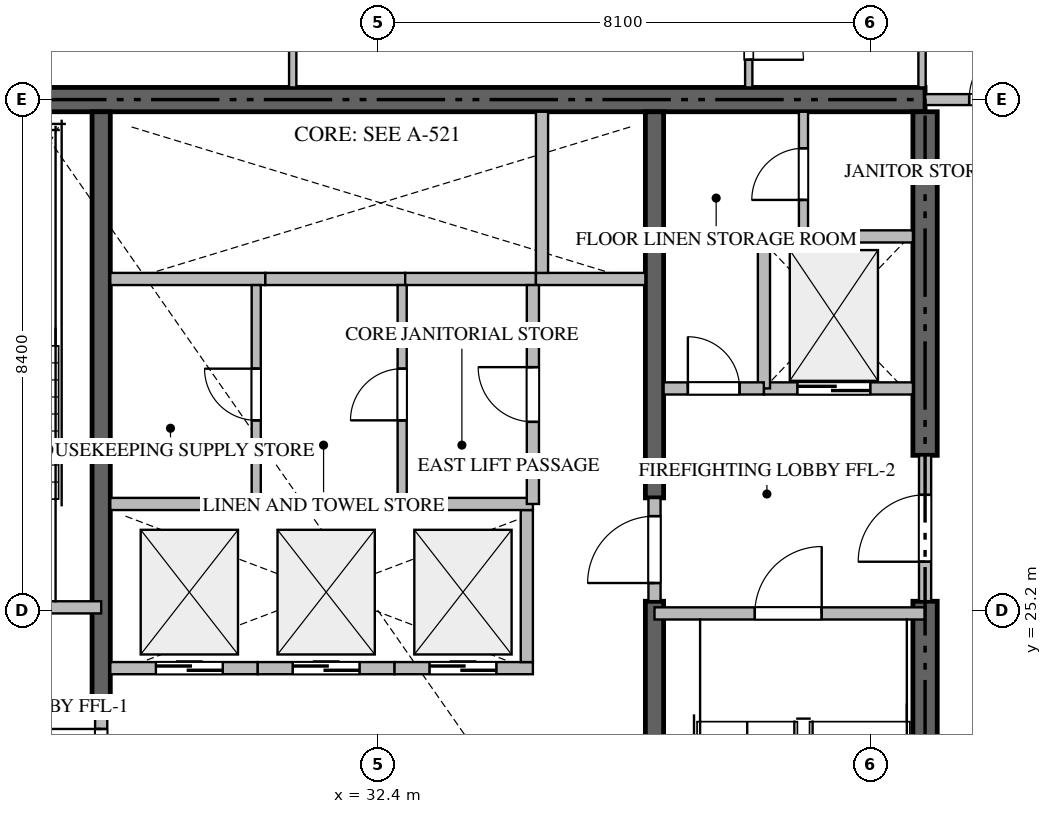
"""IFC4 building model, lengths in metres.
Left out: names, types, materials, properties, quantities, classifications, styles, units other than length and angle.
Written with IfcOpenShell. Run it as: python <this file> out.ifc"""

import sys

from ifc_helpers import new_model, si_unit, direction, frame, frame_2d, origin, place, context, subcontext, project, spatial, rectangle, extrude, source, transform, mapped, element, fill, save


model = new_model("IFC4")
c1 = context("Model", 3, precision=1e-05, world=origin(), true_north=direction((0.0, 1.0)))
c2 = subcontext(c1, "Body", "Model", "MODEL_VIEW")
j1 = project(units=[si_unit("LENGTHUNIT", "METRE"), si_unit("PLANEANGLEUNIT", "RADIAN")], contexts=[c1])
p1 = place(None, origin())
s1 = spatial("IfcSite", under=j1, at=p1, CompositionType="ELEMENT")
p2 = place(p1, origin())
s2 = spatial("IfcBuilding", under=s1, at=p2, CompositionType="ELEMENT")
p3 = place(p2, frame((0.0, 0.0, 195.15)))
s3 = spatial("IfcBuildingStorey", under=s2, at=p3, CompositionType="ELEMENT", Elevation=195.15)
p4 = place(p3, frame((41.4, 33.6, -0.26), z_axis=(0.0, 0.0, 1.0), x_axis=(-1.0, 0.0, 0.0)))
e1 = element("IfcWall", 1, at=p4, inside=s3, PredefinedType="SHEAR", context=c2, shape_type="SweptSolid", body=[
    extrude(rectangle(XDim=18.0, YDim=0.4, at=frame_2d((9.0, 0.0))), origin(), (0.0, 0.0, 1.0), 3.568),
])
p5 = place(p3, frame((41.4, 17.0, -0.26), z_axis=(0.0, 0.0, 1.0), x_axis=(0.0, 1.0, 0.0)))
e2 = element("IfcWall", 2, at=p5, inside=s3, PredefinedType="SHEAR", context=c2, shape_type="SweptSolid", body=[
    extrude(rectangle(XDim=8.35, YDim=0.4, at=frame_2d((4.175, 0.0))), origin(), (0.0, 0.0, 1.0), 3.568),
])
p6 = place(p3, frame((41.4, 27.75, -0.26), z_axis=(0.0, 0.0, 1.0), x_axis=(0.0, 1.0, 0.0)))
e3 = element("IfcWall", 3, at=p6, inside=s3, PredefinedType="SHEAR", context=c2, shape_type="SweptSolid", body=[
    extrude(rectangle(XDim=5.65, YDim=0.4, at=frame_2d((2.825, 0.0))), origin(), (0.0, 0.0, 1.0), 3.568),
])
p7 = place(p3, frame((27.85, 23.55, -0.26), z_axis=(0.0, 0.0, 1.0), x_axis=(0.0, 1.0, 0.0)))
e4 = element("IfcWall", 4, at=p7, inside=s3, PredefinedType="SHEAR", context=c2, shape_type="SweptSolid", body=[
    extrude(rectangle(XDim=9.85, YDim=0.3, at=frame_2d((4.925, 0.0))), origin(), (0.0, 0.0, 1.0), 3.568),
])
p8 = place(p3, frame((36.95, 17.0, -0.26), z_axis=(0.0, 0.0, 1.0), x_axis=(0.0, 1.0, 0.0)))
e5 = element("IfcWall", 5, at=p8, inside=s3, PredefinedType="SHEAR", context=c2, shape_type="SweptSolid", body=[
    extrude(rectangle(XDim=8.35, YDim=0.3, at=frame_2d((4.175, 0.0))), origin(), (0.0, 0.0, 1.0), 3.568),
])
p9 = place(p3, frame((36.95, 27.05, -0.26), z_axis=(0.0, 0.0, 1.0), x_axis=(0.0, 1.0, 0.0)))
e6 = element("IfcWall", 6, at=p9, inside=s3, PredefinedType="SHEAR", context=c2, shape_type="SweptSolid", body=[
    extrude(rectangle(XDim=6.35, YDim=0.3, at=frame_2d((3.175, 0.0))), origin(), (0.0, 0.0, 1.0), 3.568),
])
p10 = place(p3, frame((23.4, 25.25, 0.0), z_axis=(0.0, 0.0, 1.0), x_axis=(1.0, 0.0, 0.0)))
e7 = element("IfcWall", 7, at=p10, inside=s3, PredefinedType="STANDARD", context=c2, shape_type="SweptSolid", body=[
    extrude(rectangle(XDim=4.45, YDim=0.2, at=frame_2d((2.225, 0.0))), origin(), (0.0, 0.0, 1.0), 3.31),
])
p11 = place(p10, frame((1.65, 0.0, 0.0)))
e8 = element("IfcOpeningElement", 8, at=p11, cuts=e7, PredefinedType="OPENING", context=c2, shape_type="SweptSolid", body=[
    extrude(rectangle(XDim=1.1, YDim=2.15, at=frame_2d((0.55, 1.075))), frame((0.0, 0.11, 0.0), z_axis=(0.0, -1.0, 0.0), x_axis=(1.0, 0.0, 0.0)), (0.0, 0.0, 1.0), 0.22),
])
p12 = place(p3, frame((36.95, 25.15, 0.0), z_axis=(0.0, 0.0, 1.0), x_axis=(1.0, 0.0, 0.0)))
e9 = element("IfcWall", 9, at=p12, inside=s3, PredefinedType="STANDARD", context=c2, shape_type="SweptSolid", body=[
    extrude(rectangle(XDim=4.45, YDim=0.2, at=frame_2d((2.225, 0.0))), origin(), (0.0, 0.0, 1.0), 3.31),
])
p13 = place(p12, frame((1.65, 0.0, 0.0)))
e10 = element("IfcOpeningElement", 10, at=p13, cuts=e9, PredefinedType="OPENING", context=c2, shape_type="SweptSolid", body=[
    extrude(rectangle(XDim=1.1, YDim=2.15, at=frame_2d((0.55, 1.075))), frame((0.0, 0.11, 0.0), z_axis=(0.0, -1.0, 0.0), x_axis=(1.0, 0.0, 0.0)), (0.0, 0.0, 1.0), 0.22),
])
p14 = place(p3, frame((38.75, 28.85, 0.0), z_axis=(0.0, 0.0, 1.0), x_axis=(1.0, 0.0, 0.0)))
e11 = element("IfcWall", 11, at=p14, inside=s3, PredefinedType="STANDARD", context=c2, shape_type="SweptSolid", body=[
    extrude(rectangle(XDim=2.45, YDim=0.2, at=frame_2d((1.225, 0.0))), origin(), (0.0, 0.0, 1.0), 3.31),
])
p15 = place(p14, frame((0.55, 0.0, 0.0)))
e12 = element("IfcOpeningElement", 12, at=p15, cuts=e11, PredefinedType="OPENING", context=c2, shape_type="SweptSolid", body=[
    extrude(rectangle(XDim=1.2, YDim=2.2, at=frame_2d((0.6, 1.1))), frame((0.0, 0.11, 0.0), z_axis=(0.0, -1.0, 0.0), x_axis=(1.0, 0.0, 0.0)), (0.0, 0.0, 1.0), 0.22),
])
p16 = place(p3, frame((28.0, 24.25, 0.0), z_axis=(0.0, 0.0, 1.0), x_axis=(1.0, 0.0, 0.0)))
e13 = element("IfcWall", 13, at=p16, inside=s3, PredefinedType="STANDARD", context=c2, shape_type="SweptSolid", body=[
    extrude(rectangle(XDim=2.425, YDim=0.2, at=frame_2d((1.212, 0.0))), origin(), (0.0, 0.0, 1.0), 3.31),
])
p17 = place(p16, frame((0.75, 0.0, 0.0)))
e14 = element("IfcOpeningElement", 14, at=p17, cuts=e13, PredefinedType="OPENING", context=c2, shape_type="SweptSolid", body=[
    extrude(rectangle(XDim=1.1, YDim=2.2, at=frame_2d((0.55, 1.1))), frame((0.0, 0.11, 0.0), z_axis=(0.0, -1.0, 0.0), x_axis=(1.0, 0.0, 0.0)), (0.0, 0.0, 1.0), 0.22),
])
p18 = place(p3, frame((30.425, 24.25, 0.0), z_axis=(0.0, 0.0, 1.0), x_axis=(1.0, 0.0, 0.0)))
e15 = element("IfcWall", 15, at=p18, inside=s3, PredefinedType="STANDARD", context=c2, shape_type="SweptSolid", body=[
    extrude(rectangle(XDim=2.25, YDim=0.2, at=frame_2d((1.125, 0.0))), origin(), (0.0, 0.0, 1.0), 3.31),
])
p19 = place(p18, frame((0.575, 0.0, 0.0)))
e16 = element("IfcOpeningElement", 16, at=p19, cuts=e15, PredefinedType="OPENING", context=c2, shape_type="SweptSolid", body=[
    extrude(rectangle(XDim=1.1, YDim=2.2, at=frame_2d((0.55, 1.1))), frame((0.0, 0.11, 0.0), z_axis=(0.0, -1.0, 0.0), x_axis=(1.0, 0.0, 0.0)), (0.0, 0.0, 1.0), 0.22),
])
p20 = place(p3, frame((32.675, 24.25, 0.0), z_axis=(0.0, 0.0, 1.0), x_axis=(1.0, 0.0, 0.0)))
e17 = element("IfcWall", 17, at=p20, inside=s3, PredefinedType="STANDARD", context=c2, shape_type="SweptSolid", body=[
    extrude(rectangle(XDim=2.275, YDim=0.2, at=frame_2d((1.137, 0.0))), origin(), (0.0, 0.0, 1.0), 3.31),
])
p21 = place(p20, frame((0.575, 0.0, 0.0)))
e18 = element("IfcOpeningElement", 18, at=p21, cuts=e17, PredefinedType="OPENING", context=c2, shape_type="SweptSolid", body=[
    extrude(rectangle(XDim=1.1, YDim=2.2, at=frame_2d((0.55, 1.1))), frame((0.0, 0.11, 0.0), z_axis=(0.0, -1.0, 0.0), x_axis=(1.0, 0.0, 0.0)), (0.0, 0.0, 1.0), 0.22),
])
p22 = place(p3, frame((34.85, 24.35, 0.0), z_axis=(0.0, 0.0, 1.0), x_axis=(0.0, 1.0, 0.0)))
e19 = element("IfcWall", 19, at=p22, inside=s3, PredefinedType="STANDARD", context=c2, shape_type="SweptSolid", body=[
    extrude(rectangle(XDim=2.5, YDim=0.2, at=frame_2d((1.25, 0.0))), origin(), (0.0, 0.0, 1.0), 3.31),
])
p23 = place(p3, frame((28.0, 30.65, 0.0), z_axis=(0.0, 0.0, 1.0), x_axis=(1.0, 0.0, 0.0)))
e20 = element("IfcWall", 20, at=p23, inside=s3, PredefinedType="STANDARD", context=c2, shape_type="SweptSolid", body=[
    extrude(rectangle(XDim=2.55, YDim=0.2, at=frame_2d((1.275, 0.0))), origin(), (0.0, 0.0, 1.0), 3.31),
])
p24 = place(p3, frame((30.55, 30.65, 0.0), z_axis=(0.0, 0.0, 1.0), x_axis=(1.0, 0.0, 0.0)))
e21 = element("IfcWall", 21, at=p24, inside=s3, PredefinedType="STANDARD", context=c2, shape_type="SweptSolid", body=[
    extrude(rectangle(XDim=2.3, YDim=0.2, at=frame_2d((1.15, 0.0))), origin(), (0.0, 0.0, 1.0), 3.31),
])
p25 = place(p3, frame((32.85, 30.65, 0.0), z_axis=(0.0, 0.0, 1.0), x_axis=(1.0, 0.0, 0.0)))
e22 = element("IfcWall", 22, at=p25, inside=s3, PredefinedType="STANDARD", context=c2, shape_type="SweptSolid", body=[
    extrude(rectangle(XDim=2.15, YDim=0.2, at=frame_2d((1.075, 0.0))), origin(), (0.0, 0.0, 1.0), 3.31),
])
p26 = place(p3, frame((35.0, 30.65, 0.0), z_axis=(0.0, 0.0, 1.0), x_axis=(1.0, 0.0, 0.0)))
e23 = element("IfcWall", 23, at=p26, inside=s3, PredefinedType="STANDARD", context=c2, shape_type="SweptSolid", body=[
    extrude(rectangle(XDim=1.8, YDim=0.2, at=frame_2d((0.9, 0.0))), origin(), (0.0, 0.0, 1.0), 3.31),
])
p27 = place(p3, frame((35.1, 30.75, 0.0), z_axis=(0.0, 0.0, 1.0), x_axis=(0.0, 1.0, 0.0)))
e24 = element("IfcWall", 24, at=p27, inside=s3, PredefinedType="STANDARD", context=c2, shape_type="SweptSolid", body=[
    extrude(rectangle(XDim=2.65, YDim=0.2, at=frame_2d((1.325, 0.0))), origin(), (0.0, 0.0, 1.0), 3.31),
])
p28 = place(p3, frame((38.75, 28.85, 0.0), z_axis=(0.0, 0.0, 1.0), x_axis=(0.0, 1.0, 0.0)))
e25 = element("IfcWall", 25, at=p28, inside=s3, PredefinedType="STANDARD", context=c2, shape_type="SweptSolid", body=[
    extrude(rectangle(XDim=2.5, YDim=0.2, at=frame_2d((1.25, 0.0))), origin(), (0.0, 0.0, 1.0), 3.31),
])
p29 = place(p3, frame((38.75, 31.35, 0.0), z_axis=(0.0, 0.0, 1.0), x_axis=(1.0, 0.0, 0.0)))
e26 = element("IfcWall", 26, at=p29, inside=s3, PredefinedType="STANDARD", context=c2, shape_type="SweptSolid", body=[
    extrude(rectangle(XDim=2.45, YDim=0.2, at=frame_2d((1.225, 0.0))), origin(), (0.0, 0.0, 1.0), 3.31),
])
p30 = place(p3, frame((37.1, 28.85, 0.0), z_axis=(0.0, 0.0, 1.0), x_axis=(1.0, 0.0, 0.0)))
e27 = element("IfcWall", 27, at=p30, inside=s3, PredefinedType="STANDARD", context=c2, shape_type="SweptSolid", body=[
    extrude(rectangle(XDim=1.648, YDim=0.2, at=frame_2d((0.824, 0.0))), origin(), (0.0, 0.0, 1.0), 3.31),
])
p31 = place(p30, frame((0.399, 0.0, 0.0)))
e28 = element("IfcOpeningElement", 28, at=p31, cuts=e27, PredefinedType="OPENING", context=c2, shape_type="SweptSolid", body=[
    extrude(rectangle(XDim=0.85, YDim=2.1, at=frame_2d((0.425, 1.05))), frame((0.0, 0.11, 0.0), z_axis=(0.0, -1.0, 0.0), x_axis=(1.0, 0.0, 0.0)), (0.0, 0.0, 1.0), 0.22),
])
p32 = place(p3, frame((41.4, 25.352, 0.0), z_axis=(0.0, 0.0, 1.0), x_axis=(0.0, 1.0, 0.0)))
e29 = element("IfcWall", 29, at=p32, inside=s3, PredefinedType="STANDARD", context=c2, shape_type="SweptSolid", body=[
    extrude(rectangle(XDim=2.396, YDim=0.2, at=frame_2d((1.198, 0.0))), origin(), (0.0, 0.0, 1.0), 3.31),
])
p33 = place(p32, frame((0.648, 0.0, 0.0)))
e30 = element("IfcOpeningElement", 30, at=p33, cuts=e29, PredefinedType="OPENING", context=c2, shape_type="SweptSolid", body=[
    extrude(rectangle(XDim=1.1, YDim=2.15, at=frame_2d((0.55, 1.075))), frame((0.0, 0.11, 0.0), z_axis=(0.0, -1.0, 0.0), x_axis=(1.0, 0.0, 0.0)), (0.0, 0.0, 1.0), 0.22),
])
p34 = place(p3, frame((27.85, 21.852, 0.0), z_axis=(0.0, 0.0, 1.0), x_axis=(0.0, 1.0, 0.0)))
e31 = element("IfcWall", 31, at=p34, inside=s3, PredefinedType="STANDARD", context=c2, shape_type="SweptSolid", body=[
    extrude(rectangle(XDim=1.696, YDim=0.2, at=frame_2d((0.848, 0.0))), origin(), (0.0, 0.0, 1.0), 3.31),
])
p35 = place(p34, frame((0.298, 0.0, 0.0)))
e32 = element("IfcOpeningElement", 32, at=p35, cuts=e31, PredefinedType="OPENING", context=c2, shape_type="SweptSolid", body=[
    extrude(rectangle(XDim=1.1, YDim=2.15, at=frame_2d((0.55, 1.075))), frame((0.0, 0.11, 0.0), z_axis=(0.0, -1.0, 0.0), x_axis=(1.0, 0.0, 0.0)), (0.0, 0.0, 1.0), 0.22),
])
p36 = place(p3, frame((36.95, 25.352, 0.0), z_axis=(0.0, 0.0, 1.0), x_axis=(0.0, 1.0, 0.0)))
e33 = element("IfcWall", 33, at=p36, inside=s3, PredefinedType="STANDARD", context=c2, shape_type="SweptSolid", body=[
    extrude(rectangle(XDim=1.696, YDim=0.2, at=frame_2d((0.848, 0.0))), origin(), (0.0, 0.0, 1.0), 3.31),
])
p37 = place(p36, frame((0.298, 0.0, 0.0)))
e34 = element("IfcOpeningElement", 34, at=p37, cuts=e33, PredefinedType="OPENING", context=c2, shape_type="SweptSolid", body=[
    extrude(rectangle(XDim=1.1, YDim=2.15, at=frame_2d((0.55, 1.075))), frame((0.0, 0.11, 0.0), z_axis=(0.0, -1.0, 0.0), x_axis=(1.0, 0.0, 0.0)), (0.0, 0.0, 1.0), 0.22),
])
p38 = place(p3, frame((28.0, 26.95, 0.0), z_axis=(0.0, 0.0, 1.0), x_axis=(1.0, 0.0, 0.0)))
e35 = element("IfcWall", 35, at=p38, inside=s3, PredefinedType="STANDARD", context=c2, shape_type="SweptSolid", body=[
    extrude(rectangle(XDim=6.95, YDim=0.2, at=frame_2d((3.475, 0.0))), origin(), (0.0, 0.0, 1.0), 3.31),
])
p39 = place(p3, frame((39.4, 31.35, 0.0), z_axis=(0.0, 0.0, 1.0), x_axis=(0.0, 1.0, 0.0)))
e36 = element("IfcWall", 36, at=p39, inside=s3, PredefinedType="PARTITIONING", context=c2, shape_type="SweptSolid", body=[
    extrude(rectangle(XDim=2.05, YDim=0.15, at=frame_2d((1.025, 0.0))), origin(), (0.0, 0.0, 1.0), 3.31),
])
p40 = place(p39, frame((0.6, 0.0, 0.0)))
e37 = element("IfcOpeningElement", 37, at=p40, cuts=e36, PredefinedType="OPENING", context=c2, shape_type="SweptSolid", body=[
    extrude(rectangle(XDim=0.85, YDim=2.1, at=frame_2d((0.425, 1.05))), frame((0.0, 0.085, 0.0), z_axis=(0.0, -1.0, 0.0), x_axis=(1.0, 0.0, 0.0)), (0.0, 0.0, 1.0), 0.17),
])
p41 = place(p3, frame((34.95, 26.95, 0.0), z_axis=(0.0, 0.0, 1.0), x_axis=(0.0, 1.0, 0.0)))
e38 = element("IfcWall", 38, at=p41, inside=s3, PredefinedType="STANDARD", context=c2, shape_type="SweptSolid", body=[
    extrude(rectangle(XDim=3.6, YDim=0.2, at=frame_2d((1.8, 0.0))), origin(), (0.0, 0.0, 1.0), 3.31),
])
p42 = place(p41, frame((1.35, 0.0, 0.0)))
e39 = element("IfcOpeningElement", 39, at=p42, cuts=e38, PredefinedType="OPENING", context=c2, shape_type="SweptSolid", body=[
    extrude(rectangle(XDim=0.9, YDim=2.1, at=frame_2d((0.45, 1.05))), frame((0.0, 0.11, 0.0), z_axis=(0.0, -1.0, 0.0), x_axis=(1.0, 0.0, 0.0)), (0.0, 0.0, 1.0), 0.22),
])
p43 = place(p3, frame((32.8, 26.95, 0.0), z_axis=(0.0, 0.0, 1.0), x_axis=(0.0, 1.0, 0.0)))
e40 = element("IfcWall", 40, at=p43, inside=s3, PredefinedType="PARTITIONING", context=c2, shape_type="SweptSolid", body=[
    extrude(rectangle(XDim=3.6, YDim=0.15, at=frame_2d((1.8, 0.0))), origin(), (0.0, 0.0, 1.0), 3.31),
])
p44 = place(p43, frame((1.375, 0.0, 0.0)))
e41 = element("IfcOpeningElement", 41, at=p44, cuts=e40, PredefinedType="OPENING", context=c2, shape_type="SweptSolid", body=[
    extrude(rectangle(XDim=0.85, YDim=2.1, at=frame_2d((0.425, 1.05))), frame((0.0, 0.085, 0.0), z_axis=(0.0, -1.0, 0.0), x_axis=(1.0, 0.0, 0.0)), (0.0, 0.0, 1.0), 0.17),
])
p45 = place(p3, frame((30.4, 26.95, 0.0), z_axis=(0.0, 0.0, 1.0), x_axis=(0.0, 1.0, 0.0)))
e42 = element("IfcWall", 42, at=p45, inside=s3, PredefinedType="PARTITIONING", context=c2, shape_type="SweptSolid", body=[
    extrude(rectangle(XDim=3.6, YDim=0.15, at=frame_2d((1.8, 0.0))), origin(), (0.0, 0.0, 1.0), 3.31),
])
p46 = place(p45, frame((1.375, 0.0, 0.0)))
e43 = element("IfcOpeningElement", 43, at=p46, cuts=e42, PredefinedType="OPENING", context=c2, shape_type="SweptSolid", body=[
    extrude(rectangle(XDim=0.85, YDim=2.1, at=frame_2d((0.425, 1.05))), frame((0.0, 0.085, 0.0), z_axis=(0.0, -1.0, 0.0), x_axis=(1.0, 0.0, 0.0)), (0.0, 0.0, 1.0), 0.17),
])
p47 = place(p3, frame((41.402, 33.6, 0.0), z_axis=(0.0, 0.0, 1.0), x_axis=(1.0, 0.0, 0.0)))
e44 = element("IfcWall", 44, at=p47, inside=s3, PredefinedType="PARTITIONING", context=c2, shape_type="SweptSolid", body=[
    extrude(rectangle(XDim=2.446, YDim=0.18, at=frame_2d((1.223, 0.0))), origin(), (0.0, 0.0, 1.0), 3.31),
])
p48 = place(p47, frame((0.723, 0.0, 0.0)))
e45 = element("IfcOpeningElement", 45, at=p48, cuts=e44, PredefinedType="OPENING", context=c2, shape_type="SweptSolid", body=[
    extrude(rectangle(XDim=1.0, YDim=2.15, at=frame_2d((0.5, 1.075))), frame((0.0, 0.1, 0.0), z_axis=(0.0, -1.0, 0.0), x_axis=(1.0, 0.0, 0.0)), (0.0, 0.0, 1.0), 0.2),
])
p49 = place(p3, frame((41.35, 36.35, 0.0), z_axis=(0.0, 0.0, 1.0), x_axis=(0.0, -1.0, 0.0)))
e46 = element("IfcWall", 46, at=p49, inside=s3, PredefinedType="PARTITIONING", context=c2, shape_type="SweptSolid", body=[
    extrude(rectangle(XDim=2.55, YDim=0.12, at=frame_2d((1.275, 0.0))), origin(), (0.0, 0.0, 1.0), 3.31),
])
p50 = place(p3, frame((38.5, 35.75, 0.0), z_axis=(0.0, 0.0, 1.0), x_axis=(0.0, -1.0, 0.0)))
e47 = element("IfcWall", 47, at=p50, inside=s3, PredefinedType="PARTITIONING", context=c2, shape_type="SweptSolid", body=[
    extrude(rectangle(XDim=1.95, YDim=0.12, at=frame_2d((0.975, 0.0))), origin(), (0.0, 0.0, 1.0), 3.31),
])
p51 = place(p50, frame((0.595, 0.0, 0.0)))
e48 = element("IfcOpeningElement", 48, at=p51, cuts=e47, PredefinedType="OPENING", context=c2, shape_type="SweptSolid", body=[
    extrude(rectangle(XDim=0.9, YDim=2.1, at=frame_2d((0.45, 1.05))), frame((0.0, 0.07, 0.0), z_axis=(0.0, -1.0, 0.0), x_axis=(1.0, 0.0, 0.0)), (0.0, 0.0, 1.0), 0.14),
])
p52 = place(p3, frame((31.0, 35.748, 0.0), z_axis=(0.0, 0.0, 1.0), x_axis=(0.0, -1.0, 0.0)))
e49 = element("IfcWall", 49, at=p52, inside=s3, PredefinedType="PARTITIONING", context=c2, shape_type="SweptSolid", body=[
    extrude(rectangle(XDim=1.948, YDim=0.12, at=frame_2d((0.974, 0.0))), origin(), (0.0, 0.0, 1.0), 3.31),
])
m1 = source(origin(), c2, "Body", "SweptSolid", [
    extrude(rectangle(XDim=1.1, YDim=2.15, at=frame_2d((0.55, 1.075))), frame((0.0, 0.025, 0.0), z_axis=(0.0, -1.0, 0.0), x_axis=(1.0, 0.0, 0.0)), (0.0, 0.0, 1.0), 0.05),
])
p53 = place(p13, origin())
e50 = element("IfcDoor", 50, at=p53, inside=s3, OperationType="SINGLE_SWING_RIGHT", PredefinedType="DOOR", context=c2, shape_type="MappedRepresentation", body=[
    mapped(m1, transform((0.0, 0.0, 0.0), scale=1.0)),
])
fill(e10, e50)
m2 = source(origin(), c2, "Body", "SweptSolid", [
    extrude(rectangle(XDim=1.2, YDim=2.2, at=frame_2d((0.6, 1.1))), frame((0.0, 0.025, 0.0), z_axis=(0.0, -1.0, 0.0), x_axis=(1.0, 0.0, 0.0)), (0.0, 0.0, 1.0), 0.05),
])
p54 = place(p15, origin())
e51 = element("IfcDoor", 51, at=p54, inside=s3, OperationType="DOUBLE_DOOR_SLIDING", PredefinedType="DOOR", context=c2, shape_type="MappedRepresentation", body=[
    mapped(m2, transform((0.0, 0.0, 0.0), scale=1.0)),
])
fill(e12, e51)
m3 = source(origin(), c2, "Body", "SweptSolid", [
    extrude(rectangle(XDim=1.1, YDim=2.2, at=frame_2d((0.55, 1.1))), frame((0.0, 0.025, 0.0), z_axis=(0.0, -1.0, 0.0), x_axis=(1.0, 0.0, 0.0)), (0.0, 0.0, 1.0), 0.05),
])
p55 = place(p17, origin())
e52 = element("IfcDoor", 52, at=p55, inside=s3, OperationType="DOUBLE_DOOR_SLIDING", PredefinedType="DOOR", context=c2, shape_type="MappedRepresentation", body=[
    mapped(m3, transform((0.0, 0.0, 0.0), scale=1.0)),
])
fill(e14, e52)
p56 = place(p19, origin())
e53 = element("IfcDoor", 53, at=p56, inside=s3, OperationType="DOUBLE_DOOR_SLIDING", PredefinedType="DOOR", context=c2, shape_type="MappedRepresentation", body=[
    mapped(m3, transform((0.0, 0.0, 0.0), scale=1.0)),
])
fill(e16, e53)
p57 = place(p21, origin())
e54 = element("IfcDoor", 54, at=p57, inside=s3, OperationType="DOUBLE_DOOR_SLIDING", PredefinedType="DOOR", context=c2, shape_type="MappedRepresentation", body=[
    mapped(m3, transform((0.0, 0.0, 0.0), scale=1.0)),
])
fill(e18, e54)
m4 = source(origin(), c2, "Body", "SweptSolid", [
    extrude(rectangle(XDim=0.85, YDim=2.1, at=frame_2d((0.425, 1.05))), frame((0.0, 0.025, 0.0), z_axis=(0.0, -1.0, 0.0), x_axis=(1.0, 0.0, 0.0)), (0.0, 0.0, 1.0), 0.05),
])
p58 = place(p31, origin())
e55 = element("IfcDoor", 55, at=p58, inside=s3, OperationType="SINGLE_SWING_LEFT", PredefinedType="DOOR", context=c2, shape_type="MappedRepresentation", body=[
    mapped(m4, transform((0.0, 0.0, 0.0), scale=1.0)),
])
fill(e28, e55)
p59 = place(p33, origin())
e56 = element("IfcDoor", 56, at=p59, inside=s3, OperationType="SINGLE_SWING_LEFT", PredefinedType="DOOR", context=c2, shape_type="MappedRepresentation", body=[
    mapped(m1, transform((0.0, 0.0, 0.0), scale=1.0)),
])
fill(e30, e56)
p60 = place(p35, origin())
e57 = element("IfcDoor", 57, at=p60, inside=s3, OperationType="SINGLE_SWING_RIGHT", PredefinedType="DOOR", context=c2, shape_type="MappedRepresentation", body=[
    mapped(m1, transform((0.0, 0.0, 0.0), scale=1.0)),
])
fill(e32, e57)
p61 = place(p37, origin())
e58 = element("IfcDoor", 58, at=p61, inside=s3, OperationType="SINGLE_SWING_LEFT", PredefinedType="DOOR", context=c2, shape_type="MappedRepresentation", body=[
    mapped(m1, transform((0.0, 0.0, 0.0), scale=1.0)),
])
fill(e34, e58)
p62 = place(p40, origin())
e59 = element("IfcDoor", 59, at=p62, inside=s3, OperationType="SINGLE_SWING_LEFT", PredefinedType="DOOR", context=c2, shape_type="MappedRepresentation", body=[
    mapped(m4, transform((0.0, 0.0, 0.0), scale=1.0)),
])
fill(e37, e59)
m5 = source(origin(), c2, "Body", "SweptSolid", [
    extrude(rectangle(XDim=0.9, YDim=2.1, at=frame_2d((0.45, 1.05))), frame((0.0, 0.025, 0.0), z_axis=(0.0, -1.0, 0.0), x_axis=(1.0, 0.0, 0.0)), (0.0, 0.0, 1.0), 0.05),
])
p63 = place(p42, origin())
e60 = element("IfcDoor", 60, at=p63, inside=s3, OperationType="SINGLE_SWING_RIGHT", PredefinedType="DOOR", context=c2, shape_type="MappedRepresentation", body=[
    mapped(m5, transform((0.0, 0.0, 0.0), scale=1.0)),
])
fill(e39, e60)
p64 = place(p44, origin())
e61 = element("IfcDoor", 61, at=p64, inside=s3, OperationType="SINGLE_SWING_LEFT", PredefinedType="DOOR", context=c2, shape_type="MappedRepresentation", body=[
    mapped(m4, transform((0.0, 0.0, 0.0), scale=1.0)),
])
fill(e41, e61)
p65 = place(p46, origin())
e62 = element("IfcDoor", 62, at=p65, inside=s3, OperationType="SINGLE_SWING_RIGHT", PredefinedType="DOOR", context=c2, shape_type="MappedRepresentation", body=[
    mapped(m4, transform((0.0, 0.0, 0.0), scale=1.0)),
])
fill(e43, e62)
m6 = source(origin(), c2, "Body", "SweptSolid", [
    extrude(rectangle(XDim=1.0, YDim=2.15, at=frame_2d((0.5, 1.075))), frame((0.0, 0.025, 0.0), z_axis=(0.0, -1.0, 0.0), x_axis=(1.0, 0.0, 0.0)), (0.0, 0.0, 1.0), 0.05),
])
p66 = place(p48, origin())
e63 = element("IfcDoor", 63, at=p66, inside=s3, OperationType="SINGLE_SWING_RIGHT", PredefinedType="DOOR", context=c2, shape_type="MappedRepresentation", body=[
    mapped(m6, transform((0.0, 0.0, 0.0), scale=1.0)),
])
fill(e45, e63)
p67 = place(p51, origin())
e64 = element("IfcDoor", 64, at=p67, inside=s3, OperationType="SINGLE_SWING_RIGHT", PredefinedType="DOOR", context=c2, shape_type="MappedRepresentation", body=[
    mapped(m5, transform((0.0, 0.0, 0.0), scale=1.0)),
])
fill(e48, e64)
save(model, sys.argv[1])
